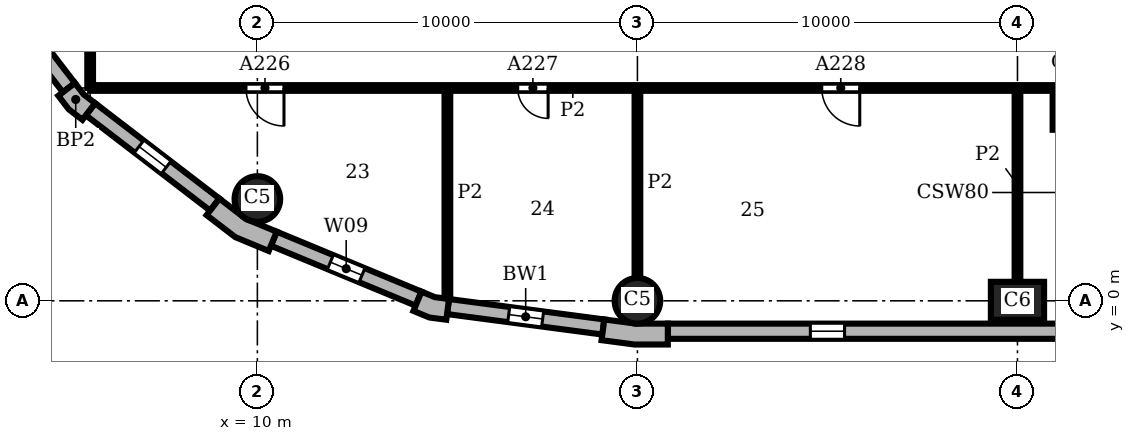
"""IFC4 building model, lengths in metres.
Left out: names, types, materials, properties, quantities, classifications, styles, units other than length and angle.
Written with IfcOpenShell. Run it as: python <this file> out.ifc"""

import sys

from ifc_helpers import new_model, si_unit, direction, frame, frame_2d, origin, origin_2d, place, context, subcontext, project, spatial, polyline, rectangle, circle, outline, extrude, element, fill, save


model = new_model("IFC4")
c1 = context("Model", 3, precision=1e-05, world=origin(), true_north=direction((0.0, 1.0)))
c2 = subcontext(c1, "Body", "Model", "MODEL_VIEW")
j1 = project(units=[si_unit("LENGTHUNIT", "METRE"), si_unit("PLANEANGLEUNIT", "RADIAN")], contexts=[c1])
p1 = place(None, origin())
s1 = spatial("IfcSite", under=j1, at=p1, CompositionType="ELEMENT")
p2 = place(p1, origin())
s2 = spatial("IfcBuilding", under=s1, at=p2, CompositionType="ELEMENT")
p3 = place(p2, frame((0.0, 0.0, 23.7)))
s3 = spatial("IfcBuildingStorey", under=s2, at=p3, CompositionType="ELEMENT", Elevation=23.7)
p4 = place(p3, frame((20.0, 0.0, 0.0), z_axis=(0.0, 0.0, 1.0), x_axis=(1.0, 0.0, 0.0)))
e1 = element("IfcColumn", 1, at=p4, inside=s3, PredefinedType="COLUMN", context=c2, shape_type="SweptSolid", body=[
    extrude(circle(Radius=0.6, at=origin_2d()), origin(), (0.0, 0.0, 1.0), 3.9),
])
p5 = place(p3, frame((30.0, 0.0, 0.0), z_axis=(0.0, 0.0, 1.0), x_axis=(1.0, 0.0, 0.0)))
e2 = element("IfcColumn", 2, at=p5, inside=s3, PredefinedType="COLUMN", context=c2, shape_type="SweptSolid", body=[
    extrude(rectangle(XDim=1.4, YDim=1.0, at=origin_2d()), origin(), (0.0, 0.0, 1.0), 3.9),
])
p6 = place(p3, frame((10.0, 2.679, 0.0), z_axis=(0.0, 0.0, 1.0), x_axis=(1.0, 0.0, 0.0)))
e3 = element("IfcColumn", 3, at=p6, inside=s3, PredefinedType="COLUMN", context=c2, shape_type="SweptSolid", body=[
    extrude(circle(Radius=0.6, at=origin_2d()), origin(), (0.0, 0.0, 1.0), 3.9),
])
p7 = place(p3, origin())
e4 = element("IfcWall", 4, at=p7, inside=s3, PredefinedType="SOLIDWALL", context=c2, shape_type="SweptSolid", body=[
    extrude(outline(polyline([(19.076, -0.887), (19.057, -1.036), (19.925, -1.15), (20.8, -1.15), (20.8, -1.0), (20.8, -0.6), (19.961, -0.6), (19.128, -0.49), (19.076, -0.887)])), origin(), (0.0, 0.0, 1.0), 3.9),
])
e5 = element("IfcWall", 5, at=p7, inside=s3, PredefinedType="SOLIDWALL", context=c2, shape_type="SweptSolid", body=[
    extrude(outline(polyline([(4.882, 5.487), (4.763, 5.396), (5.038, 5.038), (5.396, 4.763), (5.487, 4.882), (5.731, 5.199), (5.43, 5.43), (5.199, 5.731), (4.882, 5.487)])), origin(), (0.0, 0.0, 1.0), 3.9),
])
e6 = element("IfcWall", 6, at=p7, inside=s3, PredefinedType="SOLIDWALL", context=c2, shape_type="SweptSolid", body=[
    extrude(outline(polyline([(8.757, 2.373), (8.665, 2.254), (9.42, 1.675), (10.299, 1.311), (10.356, 1.449), (10.51, 1.819), (9.698, 2.155), (9.0, 2.69), (8.757, 2.373)])), origin(), (0.0, 0.0, 1.0), 3.9),
])
e7 = element("IfcWall", 7, at=p7, inside=s3, PredefinedType="SOLIDWALL", context=c2, shape_type="SweptSolid", body=[
    extrude(outline(polyline([(14.164, -0.128), (14.106, -0.266), (14.523, -0.439), (14.971, -0.498), (14.99, -0.349), (15.043, 0.047), (14.667, 0.097), (14.317, 0.242), (14.164, -0.128)])), origin(), (0.0, 0.0, 1.0), 3.9),
])
p8 = place(p3, frame((20.8, -0.8, 0.0), z_axis=(0.0, 0.0, 1.0), x_axis=(1.0, 0.0, 0.0)))
e8 = element("IfcWall", 8, at=p8, inside=s3, PredefinedType="SOLIDWALL", context=c2, shape_type="SweptSolid", body=[
    extrude(rectangle(XDim=48.4, YDim=0.4, at=frame_2d((24.2, 0.0))), origin(), (0.0, 0.0, 1.0), 3.9),
])
p9 = place(p8, frame((3.75, 0.0, 0.9)))
e9 = element("IfcOpeningElement", 9, at=p9, cuts=e8, PredefinedType="OPENING", context=c2, shape_type="SweptSolid", body=[
    extrude(rectangle(XDim=0.9, YDim=2.35, at=frame_2d((0.45, 1.175))), frame((0.0, 0.21, 0.0), z_axis=(0.0, -1.0, 0.0), x_axis=(1.0, 0.0, 0.0)), (0.0, 0.0, 1.0), 0.42),
])
p10 = place(p8, frame((13.75, 0.0, 0.9)))
e10 = element("IfcOpeningElement", 10, at=p10, cuts=e8, PredefinedType="OPENING", context=c2, shape_type="SweptSolid", body=[
    extrude(rectangle(XDim=0.9, YDim=2.35, at=frame_2d((0.45, 1.175))), frame((0.0, 0.21, 0.0), z_axis=(0.0, -1.0, 0.0), x_axis=(1.0, 0.0, 0.0)), (0.0, 0.0, 1.0), 0.42),
])
p11 = place(p8, frame((23.75, 0.0, 0.9)))
e11 = element("IfcOpeningElement", 11, at=p11, cuts=e8, PredefinedType="OPENING", context=c2, shape_type="SweptSolid", body=[
    extrude(rectangle(XDim=0.9, YDim=2.35, at=frame_2d((0.45, 1.175))), frame((0.0, 0.21, 0.0), z_axis=(0.0, -1.0, 0.0), x_axis=(1.0, 0.0, 0.0)), (0.0, 0.0, 1.0), 0.42),
])
p12 = place(p8, frame((33.75, 0.0, 0.9)))
e12 = element("IfcOpeningElement", 12, at=p12, cuts=e8, PredefinedType="OPENING", context=c2, shape_type="SweptSolid", body=[
    extrude(rectangle(XDim=0.9, YDim=2.35, at=frame_2d((0.45, 1.175))), frame((0.0, 0.21, 0.0), z_axis=(0.0, -1.0, 0.0), x_axis=(1.0, 0.0, 0.0)), (0.0, 0.0, 1.0), 0.42),
])
p13 = place(p8, frame((43.75, 0.0, 0.9)))
e13 = element("IfcOpeningElement", 13, at=p13, cuts=e8, PredefinedType="OPENING", context=c2, shape_type="SweptSolid", body=[
    extrude(rectangle(XDim=0.9, YDim=2.35, at=frame_2d((0.45, 1.175))), frame((0.0, 0.21, 0.0), z_axis=(0.0, -1.0, 0.0), x_axis=(1.0, 0.0, 0.0)), (0.0, 0.0, 1.0), 0.42),
])
p14 = place(p3, frame((2.532, 8.878, 0.0), z_axis=(0.0, 0.0, 1.0), x_axis=(0.608759824817, -0.793354571229, 0.0)))
e14 = element("IfcWall", 14, at=p14, inside=s3, PredefinedType="SOLIDWALL", context=c2, shape_type="SweptSolid", body=[
    extrude(rectangle(XDim=4.121, YDim=0.4, at=frame_2d((2.061, 0.0))), origin(), (0.0, 0.0, 1.0), 3.9),
])
p15 = place(p14, frame((1.611, 0.0, 0.9)))
e15 = element("IfcOpeningElement", 15, at=p15, cuts=e14, PredefinedType="OPENING", context=c2, shape_type="SweptSolid", body=[
    extrude(rectangle(XDim=0.9, YDim=2.35, at=frame_2d((0.45, 1.175))), frame((0.0, 0.21, 0.0), z_axis=(0.0, -1.0, 0.0), x_axis=(1.0, 0.0, 0.0)), (0.0, 0.0, 1.0), 0.42),
])
p16 = place(p3, frame((5.609, 5.041, 0.0), z_axis=(0.0, 0.0, 1.0), x_axis=(0.793354571229, -0.608759824817, 0.0)))
e16 = element("IfcWall", 16, at=p16, inside=s3, PredefinedType="SOLIDWALL", context=c2, shape_type="SweptSolid", body=[
    extrude(rectangle(XDim=4.121, YDim=0.4, at=frame_2d((2.061, 0.0))), origin(), (0.0, 0.0, 1.0), 3.9),
])
p17 = place(p16, frame((1.611, 0.0, 0.9)))
e17 = element("IfcOpeningElement", 17, at=p17, cuts=e16, PredefinedType="OPENING", context=c2, shape_type="SweptSolid", body=[
    extrude(rectangle(XDim=0.9, YDim=2.35, at=frame_2d((0.45, 1.175))), frame((0.0, 0.21, 0.0), z_axis=(0.0, -1.0, 0.0), x_axis=(1.0, 0.0, 0.0)), (0.0, 0.0, 1.0), 0.42),
])
p18 = place(p3, frame((10.433, 1.634, 0.0), z_axis=(0.0, 0.0, 1.0), x_axis=(0.923863744394, -0.382721546029, 0.0)))
e18 = element("IfcWall", 18, at=p18, inside=s3, PredefinedType="SOLIDWALL", context=c2, shape_type="SweptSolid", body=[
    extrude(rectangle(XDim=4.121, YDim=0.4, at=frame_2d((2.061, 0.0))), origin(), (0.0, 0.0, 1.0), 3.9),
])
p19 = place(p18, frame((1.611, 0.0, 0.9)))
e19 = element("IfcOpeningElement", 19, at=p19, cuts=e18, PredefinedType="OPENING", context=c2, shape_type="SweptSolid", body=[
    extrude(rectangle(XDim=0.9, YDim=2.35, at=frame_2d((0.45, 1.175))), frame((0.0, 0.21, 0.0), z_axis=(0.0, -1.0, 0.0), x_axis=(1.0, 0.0, 0.0)), (0.0, 0.0, 1.0), 0.42),
])
p20 = place(p3, frame((15.017, -0.151, 0.0), z_axis=(0.0, 0.0, 1.0), x_axis=(0.991446429508, -0.130514280502, 0.0)))
e20 = element("IfcWall", 20, at=p20, inside=s3, PredefinedType="SOLIDWALL", context=c2, shape_type="SweptSolid", body=[
    extrude(rectangle(XDim=4.121, YDim=0.4, at=frame_2d((2.061, 0.0))), origin(), (0.0, 0.0, 1.0), 3.9),
])
p21 = place(p20, frame((1.611, 0.0, 0.9)))
e21 = element("IfcOpeningElement", 21, at=p21, cuts=e20, PredefinedType="OPENING", context=c2, shape_type="SweptSolid", body=[
    extrude(rectangle(XDim=0.9, YDim=2.35, at=frame_2d((0.45, 1.175))), frame((0.0, 0.21, 0.0), z_axis=(0.0, -1.0, 0.0), x_axis=(1.0, 0.0, 0.0)), (0.0, 0.0, 1.0), 0.42),
])
p22 = place(p3, frame((5.6, 5.6, 0.0), z_axis=(0.0, 0.0, 1.0), x_axis=(0.0, 1.0, 0.0)))
e22 = element("IfcWall", 22, at=p22, inside=s3, PredefinedType="PARTITIONING", context=c2, shape_type="SweptSolid", body=[
    extrude(rectangle(XDim=54.4, YDim=0.15, at=frame_2d((27.2, 0.0))), origin(), (0.0, 0.0, 1.0), 3.58),
])
p23 = place(p22, frame((6.0, 0.0, 0.0)))
e23 = element("IfcOpeningElement", 23, at=p23, cuts=e22, PredefinedType="OPENING", context=c2, shape_type="SweptSolid", body=[
    extrude(rectangle(XDim=1.0, YDim=2.1, at=frame_2d((0.5, 1.05))), frame((0.0, 0.085, 0.0), z_axis=(0.0, -1.0, 0.0), x_axis=(1.0, 0.0, 0.0)), (0.0, 0.0, 1.0), 0.17),
])
p24 = place(p22, frame((11.75, 0.0, 0.0)))
e24 = element("IfcOpeningElement", 24, at=p24, cuts=e22, PredefinedType="OPENING", context=c2, shape_type="SweptSolid", body=[
    extrude(rectangle(XDim=1.0, YDim=2.1, at=frame_2d((0.5, 1.05))), frame((0.0, 0.085, 0.0), z_axis=(0.0, -1.0, 0.0), x_axis=(1.0, 0.0, 0.0)), (0.0, 0.0, 1.0), 0.17),
])
p25 = place(p22, frame((18.75, 0.0, 0.0)))
e25 = element("IfcOpeningElement", 25, at=p25, cuts=e22, PredefinedType="OPENING", context=c2, shape_type="SweptSolid", body=[
    extrude(rectangle(XDim=1.0, YDim=2.1, at=frame_2d((0.5, 1.05))), frame((0.0, 0.085, 0.0), z_axis=(0.0, -1.0, 0.0), x_axis=(1.0, 0.0, 0.0)), (0.0, 0.0, 1.0), 0.17),
])
p26 = place(p22, frame((28.3, 0.0, 0.0)))
e26 = element("IfcOpeningElement", 26, at=p26, cuts=e22, PredefinedType="OPENING", context=c2, shape_type="SweptSolid", body=[
    extrude(rectangle(XDim=1.0, YDim=2.1, at=frame_2d((0.5, 1.05))), frame((0.0, 0.085, 0.0), z_axis=(0.0, -1.0, 0.0), x_axis=(1.0, 0.0, 0.0)), (0.0, 0.0, 1.0), 0.17),
])
p27 = place(p22, frame((37.75, 0.0, 0.0)))
e27 = element("IfcOpeningElement", 27, at=p27, cuts=e22, PredefinedType="OPENING", context=c2, shape_type="SweptSolid", body=[
    extrude(rectangle(XDim=1.0, YDim=2.1, at=frame_2d((0.5, 1.05))), frame((0.0, 0.085, 0.0), z_axis=(0.0, -1.0, 0.0), x_axis=(1.0, 0.0, 0.0)), (0.0, 0.0, 1.0), 0.17),
])
p28 = place(p22, frame((49.5, 0.0, 0.0)))
e28 = element("IfcOpeningElement", 28, at=p28, cuts=e22, PredefinedType="OPENING", context=c2, shape_type="SweptSolid", body=[
    extrude(rectangle(XDim=1.0, YDim=2.1, at=frame_2d((0.5, 1.05))), frame((0.0, 0.085, 0.0), z_axis=(0.0, -1.0, 0.0), x_axis=(1.0, 0.0, 0.0)), (0.0, 0.0, 1.0), 0.17),
])
p29 = place(p3, frame((15.0, 0.063, 0.0), z_axis=(0.0, 0.0, 1.0), x_axis=(0.0, 1.0, 0.0)))
e29 = element("IfcWall", 29, at=p29, inside=s3, PredefinedType="PARTITIONING", context=c2, shape_type="SweptSolid", body=[
    extrude(rectangle(XDim=5.537, YDim=0.15, at=frame_2d((2.769, 0.0))), origin(), (0.0, 0.0, 1.0), 3.58),
])
p30 = place(p3, frame((20.0, 0.6, 0.0), z_axis=(0.0, 0.0, 1.0), x_axis=(0.0, 1.0, 0.0)))
e30 = element("IfcWall", 30, at=p30, inside=s3, PredefinedType="PARTITIONING", context=c2, shape_type="SweptSolid", body=[
    extrude(rectangle(XDim=5.0, YDim=0.15, at=frame_2d((2.5, 0.0))), origin(), (0.0, 0.0, 1.0), 3.58),
])
p31 = place(p3, frame((30.0, 0.5, 0.0), z_axis=(0.0, 0.0, 1.0), x_axis=(0.0, 1.0, 0.0)))
e31 = element("IfcWall", 31, at=p31, inside=s3, PredefinedType="PARTITIONING", context=c2, shape_type="SweptSolid", body=[
    extrude(rectangle(XDim=5.1, YDim=0.15, at=frame_2d((2.55, 0.0))), origin(), (0.0, 0.0, 1.0), 3.58),
])
p32 = place(p3, frame((31.0, 4.5, 0.0), z_axis=(0.0, 0.0, 1.0), x_axis=(0.0, 1.0, 0.0)))
e32 = element("IfcWall", 32, at=p32, inside=s3, PredefinedType="PARTITIONING", context=c2, shape_type="SweptSolid", body=[
    extrude(rectangle(XDim=1.1, YDim=0.15, at=frame_2d((0.55, 0.0))), origin(), (0.0, 0.0, 1.0), 3.58),
])
p33 = place(p3, frame((5.6, 5.6, 0.0), z_axis=(0.0, 0.0, 1.0), x_axis=(1.0, 0.0, 0.0)))
e33 = element("IfcWall", 33, at=p33, inside=s3, PredefinedType="PARTITIONING", context=c2, shape_type="SweptSolid", body=[
    extrude(rectangle(XDim=25.4, YDim=0.15, at=frame_2d((12.7, 0.0))), origin(), (0.0, 0.0, 1.0), 3.58),
])
p34 = place(p33, frame((4.1, 0.0, 0.0)))
e34 = element("IfcOpeningElement", 34, at=p34, cuts=e33, PredefinedType="OPENING", context=c2, shape_type="SweptSolid", body=[
    extrude(rectangle(XDim=1.0, YDim=2.1, at=frame_2d((0.5, 1.05))), frame((0.0, 0.085, 0.0), z_axis=(0.0, -1.0, 0.0), x_axis=(1.0, 0.0, 0.0)), (0.0, 0.0, 1.0), 0.17),
])
p35 = place(p33, frame((11.25, 0.0, 0.0)))
e35 = element("IfcOpeningElement", 35, at=p35, cuts=e33, PredefinedType="OPENING", context=c2, shape_type="SweptSolid", body=[
    extrude(rectangle(XDim=0.8, YDim=2.1, at=frame_2d((0.4, 1.05))), frame((0.0, 0.085, 0.0), z_axis=(0.0, -1.0, 0.0), x_axis=(1.0, 0.0, 0.0)), (0.0, 0.0, 1.0), 0.17),
])
p36 = place(p33, frame((19.25, 0.0, 0.0)))
e36 = element("IfcOpeningElement", 36, at=p36, cuts=e33, PredefinedType="OPENING", context=c2, shape_type="SweptSolid", body=[
    extrude(rectangle(XDim=1.0, YDim=2.1, at=frame_2d((0.5, 1.05))), frame((0.0, 0.085, 0.0), z_axis=(0.0, -1.0, 0.0), x_axis=(1.0, 0.0, 0.0)), (0.0, 0.0, 1.0), 0.17),
])
p37 = place(p9, origin())
e37 = element("IfcWindow", 37, at=p37, inside=s3, PartitioningType="SINGLE_PANEL", PredefinedType="WINDOW", context=c2, shape_type="SweptSolid", body=[
    extrude(rectangle(XDim=0.9, YDim=2.35, at=frame_2d((0.45, 1.175))), frame((0.0, 0.16, 0.0), z_axis=(0.0, -1.0, 0.0), x_axis=(1.0, 0.0, 0.0)), (0.0, 0.0, 1.0), 0.06),
])
fill(e9, e37)
p38 = place(p17, origin())
e38 = element("IfcWindow", 38, at=p38, inside=s3, PartitioningType="SINGLE_PANEL", PredefinedType="WINDOW", context=c2, shape_type="SweptSolid", body=[
    extrude(rectangle(XDim=0.9, YDim=2.35, at=frame_2d((0.45, 1.175))), frame((0.0, 0.16, 0.0), z_axis=(0.0, -1.0, 0.0), x_axis=(1.0, 0.0, 0.0)), (0.0, 0.0, 1.0), 0.06),
])
fill(e17, e38)
p39 = place(p19, origin())
e39 = element("IfcWindow", 39, at=p39, inside=s3, PartitioningType="SINGLE_PANEL", PredefinedType="WINDOW", context=c2, shape_type="SweptSolid", body=[
    extrude(rectangle(XDim=0.9, YDim=2.35, at=frame_2d((0.45, 1.175))), frame((0.0, 0.16, 0.0), z_axis=(0.0, -1.0, 0.0), x_axis=(1.0, 0.0, 0.0)), (0.0, 0.0, 1.0), 0.06),
])
fill(e19, e39)
p40 = place(p21, origin())
e40 = element("IfcWindow", 40, at=p40, inside=s3, PartitioningType="SINGLE_PANEL", PredefinedType="WINDOW", context=c2, shape_type="SweptSolid", body=[
    extrude(rectangle(XDim=0.9, YDim=2.35, at=frame_2d((0.45, 1.175))), frame((0.0, 0.16, 0.0), z_axis=(0.0, -1.0, 0.0), x_axis=(1.0, 0.0, 0.0)), (0.0, 0.0, 1.0), 0.06),
])
fill(e21, e40)
p41 = place(p34, frame((1.0, 0.0, 0.0), z_axis=(0.0, 0.0, 1.0), x_axis=(-1.0, 0.0, 0.0)))
e41 = element("IfcDoor", 41, at=p41, inside=s3, OperationType="SINGLE_SWING_LEFT", PredefinedType="DOOR", context=c2, shape_type="SweptSolid", body=[
    extrude(rectangle(XDim=1.0, YDim=2.1, at=frame_2d((0.5, 1.05))), frame((0.0, 0.025, 0.0), z_axis=(0.0, -1.0, 0.0), x_axis=(1.0, 0.0, 0.0)), (0.0, 0.0, 1.0), 0.05),
])
fill(e34, e41)
p42 = place(p35, frame((0.8, 0.0, 0.0), z_axis=(0.0, 0.0, 1.0), x_axis=(-1.0, 0.0, 0.0)))
e42 = element("IfcDoor", 42, at=p42, inside=s3, OperationType="SINGLE_SWING_LEFT", PredefinedType="DOOR", context=c2, shape_type="SweptSolid", body=[
    extrude(rectangle(XDim=0.8, YDim=2.1, at=frame_2d((0.4, 1.05))), frame((0.0, 0.025, 0.0), z_axis=(0.0, -1.0, 0.0), x_axis=(1.0, 0.0, 0.0)), (0.0, 0.0, 1.0), 0.05),
])
fill(e35, e42)
p43 = place(p36, frame((1.0, 0.0, 0.0), z_axis=(0.0, 0.0, 1.0), x_axis=(-1.0, 0.0, 0.0)))
e43 = element("IfcDoor", 43, at=p43, inside=s3, OperationType="SINGLE_SWING_LEFT", PredefinedType="DOOR", context=c2, shape_type="SweptSolid", body=[
    extrude(rectangle(XDim=1.0, YDim=2.1, at=frame_2d((0.5, 1.05))), frame((0.0, 0.025, 0.0), z_axis=(0.0, -1.0, 0.0), x_axis=(1.0, 0.0, 0.0)), (0.0, 0.0, 1.0), 0.05),
])
fill(e36, e43)
save(model, sys.argv[1])
